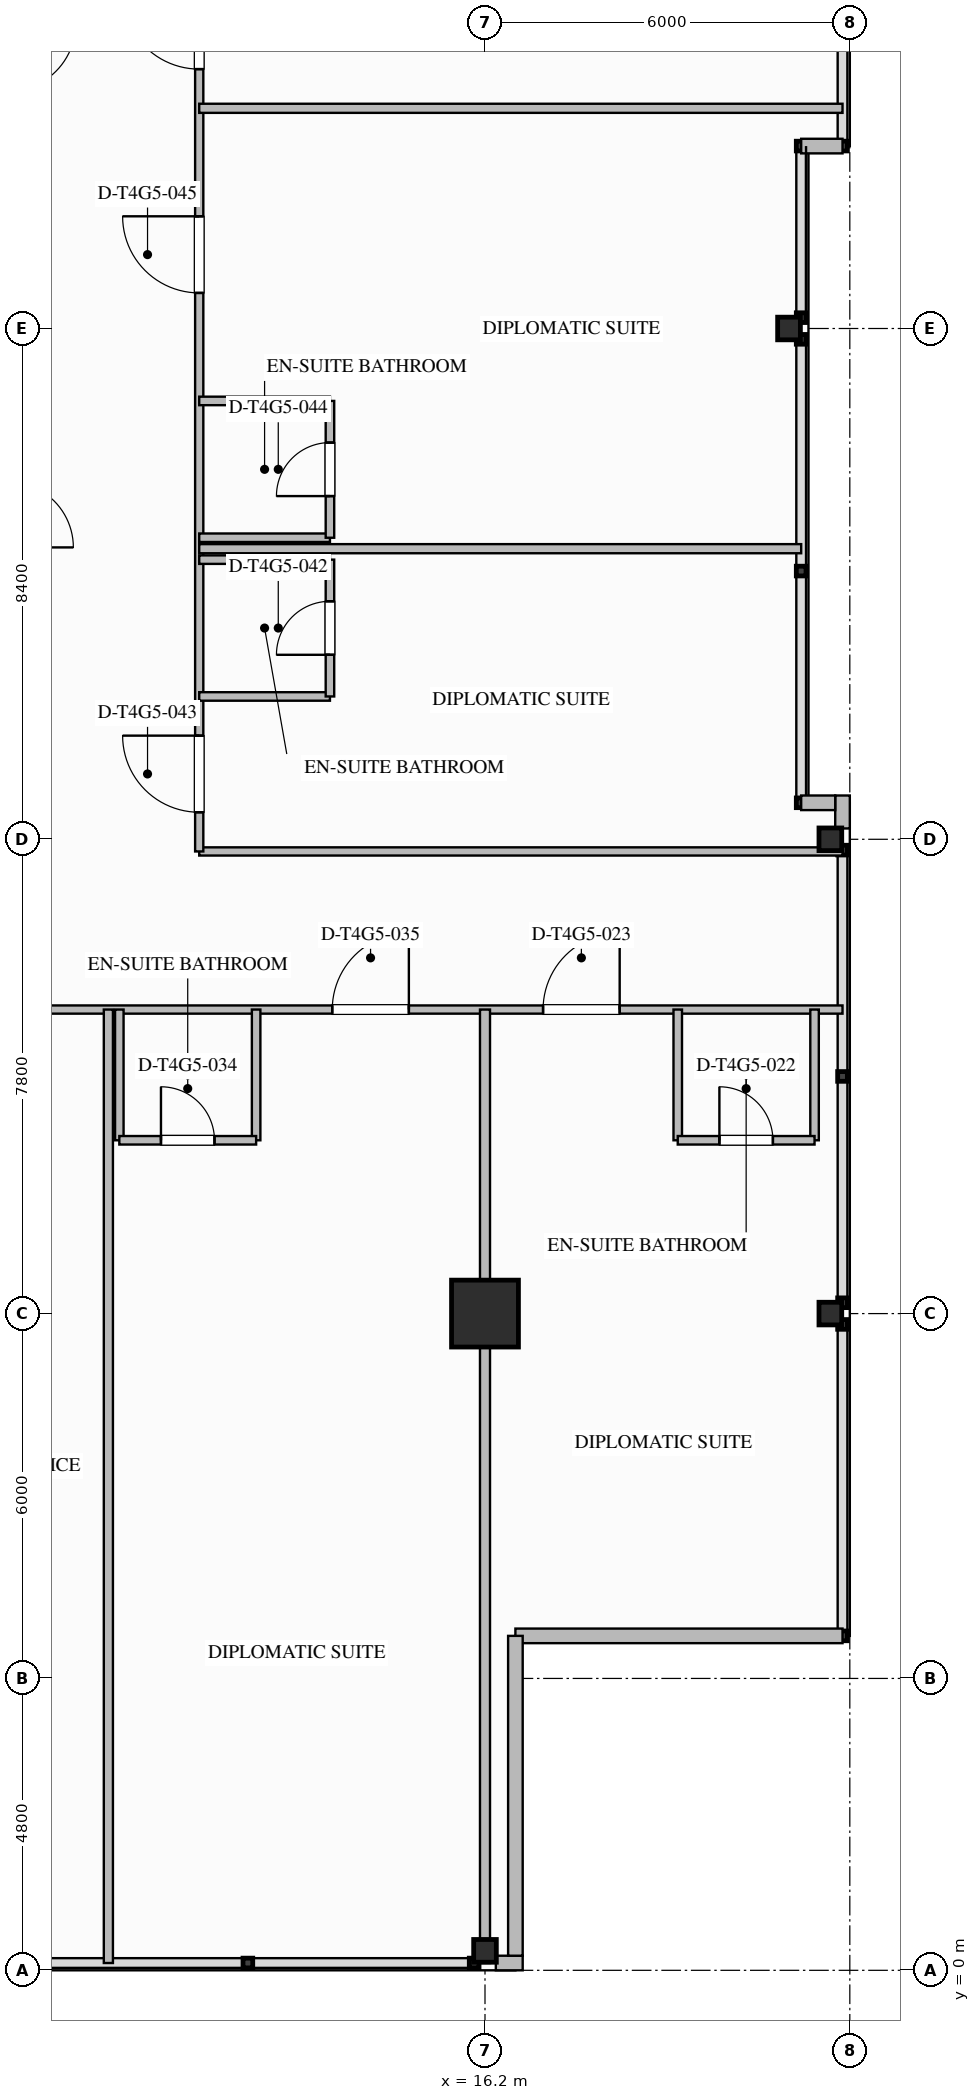
"""IFC4 building model, lengths in metres.
Left out: names, types, materials, properties, quantities, classifications, styles, units other than length and angle.
Written with IfcOpenShell. Run it as: python <this file> out.ifc"""

import sys

from ifc_helpers import new_model, si_unit, direction, frame, frame_2d, origin, origin_2d, place, context, subcontext, project, spatial, rectangle, i_section, extrude, element, fill, save


model = new_model("IFC4")
c1 = context("Model", 3, precision=1e-05, world=origin(), true_north=direction((0.0, 1.0)))
c2 = subcontext(c1, "Body", "Model", "MODEL_VIEW")
j1 = project(units=[si_unit("LENGTHUNIT", "METRE"), si_unit("PLANEANGLEUNIT", "RADIAN")], contexts=[c1])
p1 = place(None, origin())
s1 = spatial("IfcSite", under=j1, at=p1, CompositionType="ELEMENT")
p2 = place(p1, origin())
s2 = spatial("IfcBuilding", under=s1, at=p2, CompositionType="ELEMENT")
p3 = place(p2, frame((0.0, 0.0, 248.3)))
s3 = spatial("IfcBuildingStorey", under=s2, at=p3, CompositionType="ELEMENT", Elevation=248.3)
p4 = place(p3, frame((16.2, 10.8, 0.0), z_axis=(0.0, 0.0, 1.0), x_axis=(1.0, 0.0, 0.0)))
e1 = element("IfcColumn", 1, at=p4, inside=s3, PredefinedType="COLUMN", context=c2, shape_type="SweptSolid", body=[
    extrude(rectangle(XDim=1.1, YDim=1.1, at=origin_2d()), origin(), (0.0, 0.0, 1.0), 3.6),
])
for number, where, z_axis, x_axis in (
    (2, (21.88, 10.8, 0.0), (0.0, 0.0, 1.0), (1.0, 0.0, 0.0)),
    (3, (21.88, 18.6, 0.0), (0.0, 0.0, 1.0), (1.0, 0.0, 0.0)),
    (4, (21.2, 27.0, 0.0), (0.0, 0.0, 1.0), (1.0, 0.0, 0.0)),
    (5, (16.2, 0.32, 0.0), (0.0, 0.0, 1.0), (0.0, 1.0, 0.0)),
):
    element("IfcColumn", number, at=place(p3, frame(where, z_axis=z_axis, x_axis=x_axis)), inside=s3, PredefinedType="COLUMN", context=c2, shape_type="SweptSolid", body=[
        extrude(i_section(OverallWidth=0.374, OverallDepth=0.372, WebThickness=0.016, FlangeThickness=0.026, FilletRadius=0.025, at=origin_2d()), origin(), (0.0, 0.0, 1.0), 3.597),
    ])
p5 = place(p3, frame((22.08, 19.32, 0.0), z_axis=(0.0, 0.0, 1.0), x_axis=(0.0, -1.0, 0.0)))
e6 = element("IfcWall", 6, at=p5, inside=s3, PredefinedType="STANDARD", context=c2, shape_type="SweptSolid", body=[
    extrude(rectangle(XDim=0.542, YDim=0.24, at=frame_2d((0.271, 0.0))), origin(), (0.0, 0.0, 1.0), 3.34),
])
p6 = place(p3, frame((16.82, 0.12, 0.0), z_axis=(0.0, 0.0, 1.0), x_axis=(-1.0, 0.0, 0.0)))
e7 = element("IfcWall", 7, at=p6, inside=s3, PredefinedType="STANDARD", context=c2, shape_type="SweptSolid", body=[
    extrude(rectangle(XDim=0.442, YDim=0.24, at=frame_2d((0.221, 0.0))), origin(), (0.0, 0.0, 1.0), 3.34),
])
p7 = place(p3, frame((22.08, 5.5, 0.0), z_axis=(0.0, 0.0, 1.0), x_axis=(-1.0, 0.0, 0.0)))
e8 = element("IfcWall", 8, at=p7, inside=s3, PredefinedType="STANDARD", context=c2, shape_type="SweptSolid", body=[
    extrude(rectangle(XDim=5.38, YDim=0.24, at=frame_2d((2.69, 0.0))), origin(), (0.0, 0.0, 1.0), 3.34),
])
p8 = place(p3, frame((16.7, 5.5, 0.0), z_axis=(0.0, 0.0, 1.0), x_axis=(0.0, -1.0, 0.0)))
e9 = element("IfcWall", 9, at=p8, inside=s3, PredefinedType="STANDARD", context=c2, shape_type="SweptSolid", body=[
    extrude(rectangle(XDim=5.26, YDim=0.24, at=frame_2d((2.63, 0.0))), origin(), (0.0, 0.0, 1.0), 3.34),
])
p9 = place(p3, frame((22.08, 30.0, 0.0), z_axis=(0.0, 0.0, 1.0), x_axis=(-1.0, 0.0, 0.0)))
e10 = element("IfcWall", 10, at=p9, inside=s3, PredefinedType="STANDARD", context=c2, shape_type="SweptSolid", body=[
    extrude(rectangle(XDim=0.68, YDim=0.24, at=frame_2d((0.34, 0.0))), origin(), (0.0, 0.0, 1.0), 3.34),
])
p10 = place(p3, frame((21.4, 19.2, 0.0), z_axis=(0.0, 0.0, 1.0), x_axis=(1.0, 0.0, 0.0)))
e11 = element("IfcWall", 11, at=p10, inside=s3, PredefinedType="STANDARD", context=c2, shape_type="SweptSolid", body=[
    extrude(rectangle(XDim=0.56, YDim=0.24, at=frame_2d((0.28, 0.0))), origin(), (0.0, 0.0, 1.0), 3.34),
])
p11 = place(p3, frame((-16.2, 15.8, 0.0), z_axis=(0.0, 0.0, 1.0), x_axis=(1.0, 0.0, 0.0)))
e12 = element("IfcWall", 12, at=p11, inside=s3, PredefinedType="PARTITIONING", context=c2, shape_type="SweptSolid", body=[
    extrude(rectangle(XDim=38.28, YDim=0.135, at=frame_2d((19.14, 0.0))), origin(), (0.0, 0.0, 1.0), 3.34),
])
p12 = place(p11, frame((33.355, 0.0, 0.0)))
e13 = element("IfcOpeningElement", 13, at=p12, cuts=e12, PredefinedType="OPENING", context=c2, shape_type="SweptSolid", body=[
    extrude(rectangle(XDim=1.26, YDim=2.2, at=frame_2d((0.63, 1.1))), frame((0.0, 0.077, 0.0), z_axis=(0.0, -1.0, 0.0), x_axis=(1.0, 0.0, 0.0)), (0.0, 0.0, 1.0), 0.155),
])
p13 = place(p11, frame((1.252, 0.0, 0.0)))
e14 = element("IfcOpeningElement", 14, at=p13, cuts=e12, PredefinedType="OPENING", context=c2, shape_type="SweptSolid", body=[
    extrude(rectangle(XDim=1.26, YDim=2.2, at=frame_2d((0.63, 1.1))), frame((0.0, 0.077, 0.0), z_axis=(0.0, -1.0, 0.0), x_axis=(1.0, 0.0, 0.0)), (0.0, 0.0, 1.0), 0.155),
])
p14 = place(p11, frame((7.777, 0.0, 0.0)))
e15 = element("IfcOpeningElement", 15, at=p14, cuts=e12, PredefinedType="OPENING", context=c2, shape_type="SweptSolid", body=[
    extrude(rectangle(XDim=1.02, YDim=2.15, at=frame_2d((0.51, 1.075))), frame((0.0, 0.077, 0.0), z_axis=(0.0, -1.0, 0.0), x_axis=(1.0, 0.0, 0.0)), (0.0, 0.0, 1.0), 0.155),
])
p15 = place(p11, frame((11.445, 0.0, 0.0)))
e16 = element("IfcOpeningElement", 16, at=p15, cuts=e12, PredefinedType="OPENING", context=c2, shape_type="SweptSolid", body=[
    extrude(rectangle(XDim=1.26, YDim=2.2, at=frame_2d((0.63, 1.1))), frame((0.0, 0.077, 0.0), z_axis=(0.0, -1.0, 0.0), x_axis=(1.0, 0.0, 0.0)), (0.0, 0.0, 1.0), 0.155),
])
p16 = place(p11, frame((19.425, 0.0, 0.0)))
e17 = element("IfcOpeningElement", 17, at=p16, cuts=e12, PredefinedType="OPENING", context=c2, shape_type="SweptSolid", body=[
    extrude(rectangle(XDim=0.96, YDim=2.15, at=frame_2d((0.48, 1.075))), frame((0.0, 0.077, 0.0), z_axis=(0.0, -1.0, 0.0), x_axis=(1.0, 0.0, 0.0)), (0.0, 0.0, 1.0), 0.155),
])
p17 = place(p11, frame((23.183, 0.0, 0.0)))
e18 = element("IfcOpeningElement", 18, at=p17, cuts=e12, PredefinedType="OPENING", context=c2, shape_type="SweptSolid", body=[
    extrude(rectangle(XDim=1.02, YDim=2.15, at=frame_2d((0.51, 1.075))), frame((0.0, 0.077, 0.0), z_axis=(0.0, -1.0, 0.0), x_axis=(1.0, 0.0, 0.0)), (0.0, 0.0, 1.0), 0.155),
])
p18 = place(p11, frame((29.888, 0.0, 0.0)))
e19 = element("IfcOpeningElement", 19, at=p18, cuts=e12, PredefinedType="OPENING", context=c2, shape_type="SweptSolid", body=[
    extrude(rectangle(XDim=1.26, YDim=2.2, at=frame_2d((0.63, 1.1))), frame((0.0, 0.077, 0.0), z_axis=(0.0, -1.0, 0.0), x_axis=(1.0, 0.0, 0.0)), (0.0, 0.0, 1.0), 0.155),
])
p19 = place(p3, frame((11.5, 18.4, 0.0), z_axis=(0.0, 0.0, 1.0), x_axis=(1.0, 0.0, 0.0)))
e20 = element("IfcWall", 20, at=p19, inside=s3, PredefinedType="PARTITIONING", context=c2, shape_type="SweptSolid", body=[
    extrude(rectangle(XDim=10.58, YDim=0.135, at=frame_2d((5.29, 0.0))), origin(), (0.0, 0.0, 1.0), 2.717),
])
p20 = place(p3, frame((11.5, 18.4, 0.0), z_axis=(0.0, 0.0, 1.0), x_axis=(0.0, 1.0, 0.0)))
e21 = element("IfcWall", 21, at=p20, inside=s3, PredefinedType="PARTITIONING", context=c2, shape_type="SweptSolid", body=[
    extrude(rectangle(XDim=17.2, YDim=0.135, at=frame_2d((8.6, 0.0))), origin(), (0.0, 0.0, 1.0), 3.34),
])
p21 = place(p20, frame((0.645, 0.0, 0.0)))
e22 = element("IfcOpeningElement", 22, at=p21, cuts=e21, PredefinedType="OPENING", context=c2, shape_type="SweptSolid", body=[
    extrude(rectangle(XDim=1.26, YDim=2.2, at=frame_2d((0.63, 1.1))), frame((0.0, 0.077, 0.0), z_axis=(0.0, -1.0, 0.0), x_axis=(1.0, 0.0, 0.0)), (0.0, 0.0, 1.0), 0.155),
])
p22 = place(p20, frame((9.185, 0.0, 0.0)))
e23 = element("IfcOpeningElement", 23, at=p22, cuts=e21, PredefinedType="OPENING", context=c2, shape_type="SweptSolid", body=[
    extrude(rectangle(XDim=1.26, YDim=2.2, at=frame_2d((0.63, 1.1))), frame((0.0, 0.077, 0.0), z_axis=(0.0, -1.0, 0.0), x_axis=(1.0, 0.0, 0.0)), (0.0, 0.0, 1.0), 0.155),
])
p23 = place(p20, frame((12.865, 0.0, 0.0)))
e24 = element("IfcOpeningElement", 24, at=p23, cuts=e21, PredefinedType="OPENING", context=c2, shape_type="SweptSolid", body=[
    extrude(rectangle(XDim=1.26, YDim=2.2, at=frame_2d((0.63, 1.1))), frame((0.0, 0.077, 0.0), z_axis=(0.0, -1.0, 0.0), x_axis=(1.0, 0.0, 0.0)), (0.0, 0.0, 1.0), 0.155),
])
p24 = place(p3, frame((16.2, 0.12, 0.0), z_axis=(0.0, 0.0, 1.0), x_axis=(0.0, 1.0, 0.0)))
e25 = element("IfcWall", 25, at=p24, inside=s3, PredefinedType="PARTITIONING", context=c2, shape_type="SweptSolid", body=[
    extrude(rectangle(XDim=15.68, YDim=0.165, at=frame_2d((7.84, 0.0))), origin(), (0.0, 0.0, 1.0), 2.714),
])
for number, where, z_axis, x_axis in (
    (26, (19.37, 15.8, 0.0), (0.0, 0.0, 1.0), (0.0, -1.0, 0.0)),
    (27, (21.62, 15.8, 0.0), (0.0, 0.0, 1.0), (0.0, -1.0, 0.0)),
):
    element("IfcWall", number, at=place(p3, frame(where, z_axis=z_axis, x_axis=x_axis)), inside=s3, PredefinedType="PLUMBINGWALL", context=c2, shape_type="SweptSolid", body=[
        extrude(rectangle(XDim=2.15, YDim=0.14, at=frame_2d((1.075, 0.0))), origin(), (0.0, 0.0, 1.0), 3.34),
    ])
p25 = place(p3, frame((19.37, 13.65, 0.0), z_axis=(0.0, 0.0, 1.0), x_axis=(1.0, 0.0, 0.0)))
e28 = element("IfcWall", 28, at=p25, inside=s3, PredefinedType="PLUMBINGWALL", context=c2, shape_type="SweptSolid", body=[
    extrude(rectangle(XDim=2.25, YDim=0.14, at=frame_2d((1.125, 0.0))), origin(), (0.0, 0.0, 1.0), 3.34),
])
p26 = place(p25, frame((0.685, 0.0, 0.0)))
e29 = element("IfcOpeningElement", 29, at=p26, cuts=e28, PredefinedType="OPENING", context=c2, shape_type="SweptSolid", body=[
    extrude(rectangle(XDim=0.88, YDim=2.1, at=frame_2d((0.44, 1.05))), frame((0.0, 0.08, 0.0), z_axis=(0.0, -1.0, 0.0), x_axis=(1.0, 0.0, 0.0)), (0.0, 0.0, 1.0), 0.16),
])
p27 = place(p3, frame((10.006, 0.12, 0.0), z_axis=(0.0, 0.0, 1.0), x_axis=(0.0, 1.0, 0.0)))
e30 = element("IfcWall", 30, at=p27, inside=s3, PredefinedType="PARTITIONING", context=c2, shape_type="SweptSolid", body=[
    extrude(rectangle(XDim=15.68, YDim=0.15, at=frame_2d((7.84, 0.0))), origin(), (0.0, 0.0, 1.0), 3.34),
])
p28 = place(p3, frame((10.186, 15.8, 0.0), z_axis=(0.0, 0.0, 1.0), x_axis=(0.0, -1.0, 0.0)))
e31 = element("IfcWall", 31, at=p28, inside=s3, PredefinedType="PLUMBINGWALL", context=c2, shape_type="SweptSolid", body=[
    extrude(rectangle(XDim=2.15, YDim=0.14, at=frame_2d((1.075, 0.0))), origin(), (0.0, 0.0, 1.0), 3.34),
])
p29 = place(p3, frame((12.436, 15.8, 0.0), z_axis=(0.0, 0.0, 1.0), x_axis=(0.0, -1.0, 0.0)))
e32 = element("IfcWall", 32, at=p29, inside=s3, PredefinedType="PLUMBINGWALL", context=c2, shape_type="SweptSolid", body=[
    extrude(rectangle(XDim=2.15, YDim=0.14, at=frame_2d((1.075, 0.0))), origin(), (0.0, 0.0, 1.0), 2.918),
])
p30 = place(p3, frame((10.186, 13.65, 0.0), z_axis=(0.0, 0.0, 1.0), x_axis=(1.0, 0.0, 0.0)))
e33 = element("IfcWall", 33, at=p30, inside=s3, PredefinedType="PLUMBINGWALL", context=c2, shape_type="SweptSolid", body=[
    extrude(rectangle(XDim=2.25, YDim=0.14, at=frame_2d((1.125, 0.0))), origin(), (0.0, 0.0, 1.0), 3.34),
])
p31 = place(p30, frame((0.685, 0.0, 0.0)))
e34 = element("IfcOpeningElement", 34, at=p31, cuts=e33, PredefinedType="OPENING", context=c2, shape_type="SweptSolid", body=[
    extrude(rectangle(XDim=0.88, YDim=2.1, at=frame_2d((0.44, 1.05))), frame((0.0, 0.08, 0.0), z_axis=(0.0, -1.0, 0.0), x_axis=(1.0, 0.0, 0.0)), (0.0, 0.0, 1.0), 0.16),
])
for number, where, z_axis, x_axis in (
    (35, (11.5, 20.949, 0.0), (0.0, 0.0, 1.0), (1.0, 0.0, 0.0)),
    (36, (11.5, 23.199, 0.0), (0.0, 0.0, 1.0), (1.0, 0.0, 0.0)),
):
    element("IfcWall", number, at=place(p3, frame(where, z_axis=z_axis, x_axis=x_axis)), inside=s3, PredefinedType="PLUMBINGWALL", context=c2, shape_type="SweptSolid", body=[
        extrude(rectangle(XDim=2.15, YDim=0.14, at=frame_2d((1.075, 0.0))), origin(), (0.0, 0.0, 1.0), 3.34),
    ])
p32 = place(p3, frame((13.65, 20.949, 0.0), z_axis=(0.0, 0.0, 1.0), x_axis=(0.0, 1.0, 0.0)))
e37 = element("IfcWall", 37, at=p32, inside=s3, PredefinedType="PLUMBINGWALL", context=c2, shape_type="SweptSolid", body=[
    extrude(rectangle(XDim=2.25, YDim=0.14, at=frame_2d((1.125, 0.0))), origin(), (0.0, 0.0, 1.0), 3.34),
])
p33 = place(p32, frame((0.685, 0.0, 0.0)))
e38 = element("IfcOpeningElement", 38, at=p33, cuts=e37, PredefinedType="OPENING", context=c2, shape_type="SweptSolid", body=[
    extrude(rectangle(XDim=0.88, YDim=2.1, at=frame_2d((0.44, 1.05))), frame((0.0, 0.08, 0.0), z_axis=(0.0, -1.0, 0.0), x_axis=(1.0, 0.0, 0.0)), (0.0, 0.0, 1.0), 0.16),
])
p34 = place(p3, frame((11.5, 23.379, 0.0), z_axis=(0.0, 0.0, 1.0), x_axis=(1.0, 0.0, 0.0)))
e39 = element("IfcWall", 39, at=p34, inside=s3, PredefinedType="PARTITIONING", context=c2, shape_type="SweptSolid", body=[
    extrude(rectangle(XDim=9.9, YDim=0.15, at=frame_2d((4.95, 0.0))), origin(), (0.0, 0.0, 1.0), 3.34),
])
for number, where, z_axis, x_axis in (
    (40, (11.5, 23.559, 0.0), (0.0, 0.0, 1.0), (1.0, 0.0, 0.0)),
    (41, (11.5, 25.809, 0.0), (0.0, 0.0, 1.0), (1.0, 0.0, 0.0)),
):
    element("IfcWall", number, at=place(p3, frame(where, z_axis=z_axis, x_axis=x_axis)), inside=s3, PredefinedType="PLUMBINGWALL", context=c2, shape_type="SweptSolid", body=[
        extrude(rectangle(XDim=2.15, YDim=0.14, at=frame_2d((1.075, 0.0))), origin(), (0.0, 0.0, 1.0), 3.34),
    ])
p35 = place(p3, frame((13.65, 23.559, 0.0), z_axis=(0.0, 0.0, 1.0), x_axis=(0.0, 1.0, 0.0)))
e42 = element("IfcWall", 42, at=p35, inside=s3, PredefinedType="PLUMBINGWALL", context=c2, shape_type="SweptSolid", body=[
    extrude(rectangle(XDim=2.25, YDim=0.14, at=frame_2d((1.125, 0.0))), origin(), (0.0, 0.0, 1.0), 3.34),
])
p36 = place(p35, frame((0.685, 0.0, 0.0)))
e43 = element("IfcOpeningElement", 43, at=p36, cuts=e42, PredefinedType="OPENING", context=c2, shape_type="SweptSolid", body=[
    extrude(rectangle(XDim=0.88, YDim=2.1, at=frame_2d((0.44, 1.05))), frame((0.0, 0.08, 0.0), z_axis=(0.0, -1.0, 0.0), x_axis=(1.0, 0.0, 0.0)), (0.0, 0.0, 1.0), 0.16),
])
p37 = place(p3, frame((11.5, 30.621, 0.0), z_axis=(0.0, 0.0, 1.0), x_axis=(1.0, 0.0, 0.0)))
e44 = element("IfcWall", 44, at=p37, inside=s3, PredefinedType="PARTITIONING", context=c2, shape_type="SweptSolid", body=[
    extrude(rectangle(XDim=10.58, YDim=0.15, at=frame_2d((5.29, 0.0))), origin(), (0.0, 0.0, 1.0), 3.34),
])
p38 = place(p26, origin())
e45 = element("IfcDoor", 45, at=p38, inside=s3, OperationType="SINGLE_SWING_LEFT", PredefinedType="DOOR", context=c2, shape_type="SweptSolid", body=[
    extrude(rectangle(XDim=0.88, YDim=2.1, at=frame_2d((0.44, 1.05))), frame((0.0, 0.025, 0.0), z_axis=(0.0, -1.0, 0.0), x_axis=(1.0, 0.0, 0.0)), (0.0, 0.0, 1.0), 0.05),
])
fill(e29, e45)
p39 = place(p12, origin())
e46 = element("IfcDoor", 46, at=p39, inside=s3, OperationType="SINGLE_SWING_RIGHT", PredefinedType="DOOR", context=c2, shape_type="SweptSolid", body=[
    extrude(rectangle(XDim=1.26, YDim=2.2, at=frame_2d((0.63, 1.1))), frame((0.0, 0.025, 0.0), z_axis=(0.0, -1.0, 0.0), x_axis=(1.0, 0.0, 0.0)), (0.0, 0.0, 1.0), 0.05),
])
fill(e13, e46)
p40 = place(p31, origin())
e47 = element("IfcDoor", 47, at=p40, inside=s3, OperationType="SINGLE_SWING_LEFT", PredefinedType="DOOR", context=c2, shape_type="SweptSolid", body=[
    extrude(rectangle(XDim=0.88, YDim=2.1, at=frame_2d((0.44, 1.05))), frame((0.0, 0.025, 0.0), z_axis=(0.0, -1.0, 0.0), x_axis=(1.0, 0.0, 0.0)), (0.0, 0.0, 1.0), 0.05),
])
fill(e34, e47)
p41 = place(p18, origin())
e48 = element("IfcDoor", 48, at=p41, inside=s3, OperationType="SINGLE_SWING_RIGHT", PredefinedType="DOOR", context=c2, shape_type="SweptSolid", body=[
    extrude(rectangle(XDim=1.26, YDim=2.2, at=frame_2d((0.63, 1.1))), frame((0.0, 0.025, 0.0), z_axis=(0.0, -1.0, 0.0), x_axis=(1.0, 0.0, 0.0)), (0.0, 0.0, 1.0), 0.05),
])
fill(e19, e48)
p42 = place(p33, origin())
e49 = element("IfcDoor", 49, at=p42, inside=s3, OperationType="SINGLE_SWING_LEFT", PredefinedType="DOOR", context=c2, shape_type="SweptSolid", body=[
    extrude(rectangle(XDim=0.88, YDim=2.1, at=frame_2d((0.44, 1.05))), frame((0.0, 0.025, 0.0), z_axis=(0.0, -1.0, 0.0), x_axis=(1.0, 0.0, 0.0)), (0.0, 0.0, 1.0), 0.05),
])
fill(e38, e49)
p43 = place(p21, origin())
e50 = element("IfcDoor", 50, at=p43, inside=s3, OperationType="SINGLE_SWING_RIGHT", PredefinedType="DOOR", context=c2, shape_type="SweptSolid", body=[
    extrude(rectangle(XDim=1.26, YDim=2.2, at=frame_2d((0.63, 1.1))), frame((0.0, 0.025, 0.0), z_axis=(0.0, -1.0, 0.0), x_axis=(1.0, 0.0, 0.0)), (0.0, 0.0, 1.0), 0.05),
])
fill(e22, e50)
p44 = place(p36, origin())
e51 = element("IfcDoor", 51, at=p44, inside=s3, OperationType="SINGLE_SWING_LEFT", PredefinedType="DOOR", context=c2, shape_type="SweptSolid", body=[
    extrude(rectangle(XDim=0.88, YDim=2.1, at=frame_2d((0.44, 1.05))), frame((0.0, 0.025, 0.0), z_axis=(0.0, -1.0, 0.0), x_axis=(1.0, 0.0, 0.0)), (0.0, 0.0, 1.0), 0.05),
])
fill(e43, e51)
p45 = place(p22, origin())
e52 = element("IfcDoor", 52, at=p45, inside=s3, OperationType="SINGLE_SWING_RIGHT", PredefinedType="DOOR", context=c2, shape_type="SweptSolid", body=[
    extrude(rectangle(XDim=1.26, YDim=2.2, at=frame_2d((0.63, 1.1))), frame((0.0, 0.025, 0.0), z_axis=(0.0, -1.0, 0.0), x_axis=(1.0, 0.0, 0.0)), (0.0, 0.0, 1.0), 0.05),
])
fill(e23, e52)
p46 = place(p23, origin())
e53 = element("IfcDoor", 53, at=p46, inside=s3, OperationType="SINGLE_SWING_RIGHT", PredefinedType="DOOR", context=c2, shape_type="SweptSolid", body=[
    extrude(rectangle(XDim=1.26, YDim=2.2, at=frame_2d((0.63, 1.1))), frame((0.0, 0.025, 0.0), z_axis=(0.0, -1.0, 0.0), x_axis=(1.0, 0.0, 0.0)), (0.0, 0.0, 1.0), 0.05),
])
fill(e24, e53)
save(model, sys.argv[1])
